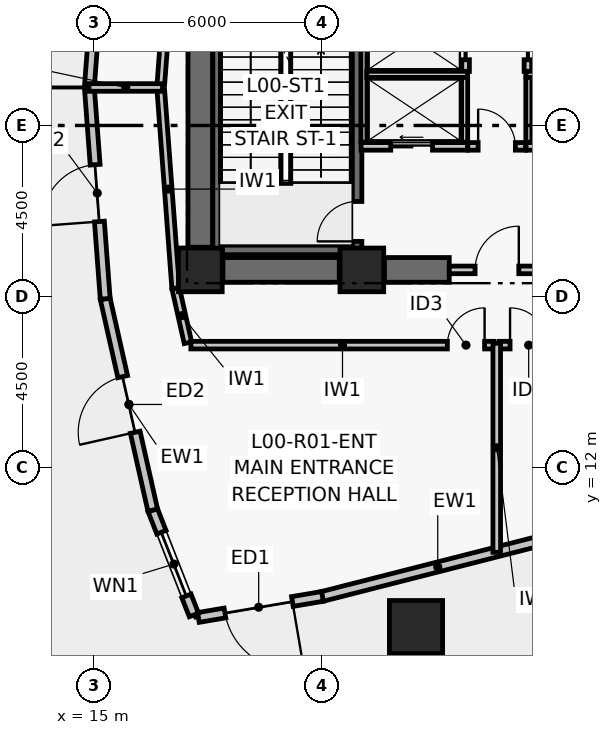
"""IFC4 building model, lengths in metres.
Left out: names, types, materials, properties, quantities, classifications, styles, units other than length and angle.
Written with IfcOpenShell. Run it as: python <this file> out.ifc"""

import sys

from ifc_helpers import new_model, si_unit, direction, frame, frame_2d, origin, origin_2d, place, context, subcontext, project, spatial, rectangle, hollow_rectangle, extrude, element, fill, save


model = new_model("IFC4")
c1 = context("Model", 3, precision=1e-05, world=origin(), true_north=direction((0.0, 1.0)))
c2 = subcontext(c1, "Body", "Model", "MODEL_VIEW")
j1 = project(units=[si_unit("LENGTHUNIT", "METRE"), si_unit("PLANEANGLEUNIT", "RADIAN")], contexts=[c1])
p1 = place(None, origin())
s1 = spatial("IfcSite", under=j1, at=p1, CompositionType="ELEMENT")
p2 = place(p1, origin())
s2 = spatial("IfcBuilding", under=s1, at=p2, CompositionType="ELEMENT")
p3 = place(p2, origin())
s3 = spatial("IfcBuildingStorey", under=s2, at=p3, CompositionType="ELEMENT", Elevation=0.0)
for number, where, z_axis, x_axis in (
    (1, (17.8, 17.2, 0.0), (0.0, 0.0, 1.0), (1.0, 0.0, 0.0)),
    (2, (22.05, 17.2, 0.0), (0.0, 0.0, 1.0), (1.0, 0.0, 0.0)),
):
    element("IfcColumn", number, at=place(p3, frame(where, z_axis=z_axis, x_axis=x_axis)), inside=s3, PredefinedType="COLUMN", context=c2, shape_type="SweptSolid", body=[
        extrude(rectangle(XDim=1.15, YDim=1.15, at=origin_2d()), origin(), (0.0, 0.0, 1.0), 7.2),
    ])
p4 = place(p3, frame((18.395, 17.2, 0.0), z_axis=(0.0, 0.0, 1.0), x_axis=(1.0, 0.0, 0.0)))
e3 = element("IfcWall", 3, at=p4, inside=s3, PredefinedType="SHEAR", context=c2, shape_type="SweptSolid", body=[
    extrude(rectangle(XDim=3.06, YDim=0.65, at=frame_2d((1.53, 0.0))), origin(), (0.0, 0.0, 1.0), 6.88),
])
p5 = place(p3, frame((22.645, 17.2, 0.0), z_axis=(0.0, 0.0, 1.0), x_axis=(1.0, 0.0, 0.0)))
e4 = element("IfcWall", 4, at=p5, inside=s3, PredefinedType="SHEAR", context=c2, shape_type="SweptSolid", body=[
    extrude(rectangle(XDim=1.705, YDim=0.65, at=frame_2d((0.853, 0.0))), origin(), (0.0, 0.0, 1.0), 6.88),
])
p6 = place(p3, frame((17.8, 17.795, 0.0), z_axis=(0.0, 0.0, 1.0), x_axis=(0.0, 1.0, 0.0)))
e5 = element("IfcWall", 5, at=p6, inside=s3, PredefinedType="SHEAR", context=c2, shape_type="SweptSolid", body=[
    extrude(rectangle(XDim=8.41, YDim=0.65, at=frame_2d((4.205, 0.0))), origin(), (0.0, 0.0, 1.0), 6.88),
])
p7 = place(p3, frame((18.254, 17.6, 0.0), z_axis=(0.0, 0.0, 1.0), x_axis=(0.0, 1.0, 0.0)))
e6 = element("IfcWall", 6, at=p7, inside=s3, PredefinedType="SHEAR", context=c2, shape_type="SweptSolid", body=[
    extrude(rectangle(XDim=8.8, YDim=0.25, at=frame_2d((4.4, 0.0))), origin(), (0.0, 0.0, 1.0), 6.88),
])
p8 = place(p3, frame((21.925, 17.6, 0.0), z_axis=(0.0, 0.0, 1.0), x_axis=(0.0, 1.0, 0.0)))
e7 = element("IfcWall", 7, at=p8, inside=s3, PredefinedType="SHEAR", context=c2, shape_type="SweptSolid", body=[
    extrude(rectangle(XDim=8.8, YDim=0.25, at=frame_2d((4.4, 0.0))), origin(), (0.0, 0.0, 1.0), 6.88),
])
p9 = place(p8, frame((0.35, 0.0, 0.0)))
e8 = element("IfcOpeningElement", 8, at=p9, cuts=e7, PredefinedType="OPENING", context=c2, shape_type="SweptSolid", body=[
    extrude(rectangle(XDim=1.05, YDim=2.08, at=frame_2d((0.525, 1.04))), frame((0.0, 0.135, 0.0), z_axis=(0.0, -1.0, 0.0), x_axis=(1.0, 0.0, 0.0)), (0.0, 0.0, 1.0), 0.27),
])
p10 = place(p3, frame((18.379, 17.725, 0.0), z_axis=(0.0, 0.0, 1.0), x_axis=(1.0, 0.0, 0.0)))
e9 = element("IfcWall", 9, at=p10, inside=s3, PredefinedType="SHEAR", context=c2, shape_type="SweptSolid", body=[
    extrude(rectangle(XDim=3.421, YDim=0.25, at=frame_2d((1.71, 0.0))), origin(), (0.0, 0.0, 1.0), 6.88),
])
p11 = place(p3, frame((23.476, 7.8, 0.0), z_axis=(0.0, 0.0, 1.0), x_axis=(1.0, 0.0, 0.0)))
e10 = element("IfcColumn", 10, at=p11, inside=s3, PredefinedType="USERDEFINED", context=c2, shape_type="SweptSolid", body=[
    extrude(hollow_rectangle(XDim=1.4, YDim=1.4, WallThickness=0.055, at=origin_2d()), origin(), (0.0, 0.0, 1.0), 7.2),
])
p12 = place(p3, frame((27.092, 10.16, 0.0), z_axis=(0.0, 0.0, 1.0), x_axis=(-0.968977702302, -0.247148158887, 0.0)))
e11 = element("IfcWall", 11, at=p12, inside=s3, PredefinedType="PARTITIONING", context=c2, shape_type="SweptSolid", body=[
    extrude(rectangle(XDim=6.286, YDim=0.26, at=frame_2d((3.143, 0.0))), origin(), (0.0, 0.0, 1.0), 5.43),
])
p13 = place(p3, frame((21.013, 8.609, 0.0), z_axis=(0.0, 0.0, 1.0), x_axis=(-0.985893222855, -0.167375485445, 0.0)))
e12 = element("IfcWall", 12, at=p13, inside=s3, PredefinedType="PARTITIONING", context=c2, shape_type="SweptSolid", body=[
    extrude(rectangle(XDim=3.311, YDim=0.26, at=frame_2d((1.656, 0.0))), origin(), (0.0, 0.0, 1.0), 5.43),
])
p14 = place(p13, frame((0.802, 0.0, 0.0)))
e13 = element("IfcOpeningElement", 13, at=p14, cuts=e12, PredefinedType="OPENING", context=c2, shape_type="SweptSolid", body=[
    extrude(rectangle(XDim=1.8, YDim=2.3, at=frame_2d((0.9, 1.15))), frame((0.0, 0.14, 0.0), z_axis=(0.0, -1.0, 0.0), x_axis=(1.0, 0.0, 0.0)), (0.0, 0.0, 1.0), 0.28),
])
p15 = place(p3, frame((17.631, 8.121, 0.0), z_axis=(0.0, 0.0, 1.0), x_axis=(-0.36552999723, 0.930799560123, 0.0)))
e14 = element("IfcWall", 14, at=p15, inside=s3, PredefinedType="PARTITIONING", context=c2, shape_type="SweptSolid", body=[
    extrude(rectangle(XDim=2.963, YDim=0.26, at=frame_2d((1.481, 0.0))), origin(), (0.0, 0.0, 1.0), 5.43),
])
p16 = place(p15, frame((0.538, 0.0, 0.9)))
e15 = element("IfcOpeningElement", 15, at=p16, cuts=e14, PredefinedType="OPENING", context=c2, shape_type="SweptSolid", body=[
    extrude(rectangle(XDim=1.8, YDim=1.5, at=frame_2d((0.9, 0.75))), frame((0.0, 0.14, 0.0), z_axis=(0.0, -1.0, 0.0), x_axis=(1.0, 0.0, 0.0)), (0.0, 0.0, 1.0), 0.28),
])
p17 = place(p3, frame((16.548, 10.879, 0.0), z_axis=(0.0, 0.0, 1.0), x_axis=(-0.219487732338, 0.975615259902, 0.0)))
e16 = element("IfcWall", 16, at=p17, inside=s3, PredefinedType="PARTITIONING", context=c2, shape_type="SweptSolid", body=[
    extrude(rectangle(XDim=5.699, YDim=0.26, at=frame_2d((2.85, 0.0))), origin(), (0.0, 0.0, 1.0), 5.43),
])
p18 = place(p17, frame((2.1, 0.0, 0.0)))
e17 = element("IfcOpeningElement", 17, at=p18, cuts=e16, PredefinedType="OPENING", context=c2, shape_type="SweptSolid", body=[
    extrude(rectangle(XDim=1.5, YDim=2.25, at=frame_2d((0.75, 1.125))), frame((0.0, 0.14, 0.0), z_axis=(0.0, -1.0, 0.0), x_axis=(1.0, 0.0, 0.0)), (0.0, 0.0, 1.0), 0.28),
])
p19 = place(p3, frame((15.297, 16.439, 0.0), z_axis=(0.0, 0.0, 1.0), x_axis=(-0.074824778503, 0.997196697007, 0.0)))
e18 = element("IfcWall", 18, at=p19, inside=s3, PredefinedType="PARTITIONING", context=c2, shape_type="SweptSolid", body=[
    extrude(rectangle(XDim=5.576, YDim=0.26, at=frame_2d((2.788, 0.0))), origin(), (0.0, 0.0, 1.0), 5.43),
])
p20 = place(p19, frame((2.038, 0.0, 0.0)))
e19 = element("IfcOpeningElement", 19, at=p20, cuts=e18, PredefinedType="OPENING", context=c2, shape_type="SweptSolid", body=[
    extrude(rectangle(XDim=1.5, YDim=2.25, at=frame_2d((0.75, 1.125))), frame((0.0, 0.14, 0.0), z_axis=(0.0, -1.0, 0.0), x_axis=(1.0, 0.0, 0.0)), (0.0, 0.0, 1.0), 0.28),
])
p21 = place(p3, frame((14.879, 22.0, 0.0), z_axis=(0.0, 0.0, 1.0), x_axis=(0.074824778503, 0.997196697007, 0.0)))
e20 = element("IfcWall", 20, at=p21, inside=s3, PredefinedType="PARTITIONING", context=c2, shape_type="SweptSolid", body=[
    extrude(rectangle(XDim=5.576, YDim=0.26, at=frame_2d((2.788, 0.0))), origin(), (0.0, 0.0, 1.0), 5.43),
])
p22 = place(p21, frame((2.038, 0.0, 0.0)))
e21 = element("IfcOpeningElement", 21, at=p22, cuts=e20, PredefinedType="OPENING", context=c2, shape_type="SweptSolid", body=[
    extrude(rectangle(XDim=1.5, YDim=2.25, at=frame_2d((0.75, 1.125))), frame((0.0, 0.14, 0.0), z_axis=(0.0, -1.0, 0.0), x_axis=(1.0, 0.0, 0.0)), (0.0, 0.0, 1.0), 0.28),
])
p23 = place(p3, frame((24.35, 17.2, 0.0), z_axis=(0.0, 0.0, 1.0), x_axis=(1.0, 0.0, 0.0)))
e22 = element("IfcWall", 22, at=p23, inside=s3, PredefinedType="PARTITIONING", context=c2, shape_type="SweptSolid", body=[
    extrude(rectangle(XDim=2.5, YDim=0.2, at=frame_2d((1.25, 0.0))), origin(), (0.0, 0.0, 1.0), 6.01),
])
p24 = place(p23, frame((0.68, 0.0, 0.0)))
e23 = element("IfcOpeningElement", 23, at=p24, cuts=e22, PredefinedType="OPENING", context=c2, shape_type="SweptSolid", body=[
    extrude(rectangle(XDim=1.15, YDim=2.08, at=frame_2d((0.575, 1.04))), frame((0.0, 0.11, 0.0), z_axis=(0.0, -1.0, 0.0), x_axis=(1.0, 0.0, 0.0)), (0.0, 0.0, 1.0), 0.22),
])
p25 = place(p3, frame((24.84, 20.45, 0.0), z_axis=(0.0, 0.0, 1.0), x_axis=(1.0, 0.0, 0.0)))
e24 = element("IfcWall", 24, at=p25, inside=s3, PredefinedType="PARTITIONING", context=c2, shape_type="SweptSolid", body=[
    extrude(rectangle(XDim=1.52, YDim=0.2, at=frame_2d((0.76, 0.0))), origin(), (0.0, 0.0, 1.0), 6.88),
])
p26 = place(p25, frame((0.27, 0.0, 0.0)))
e25 = element("IfcOpeningElement", 25, at=p26, cuts=e24, PredefinedType="OPENING", context=c2, shape_type="SweptSolid", body=[
    extrude(rectangle(XDim=0.98, YDim=2.06, at=frame_2d((0.49, 1.03))), frame((0.0, 0.11, 0.0), z_axis=(0.0, -1.0, 0.0), x_axis=(1.0, 0.0, 0.0)), (0.0, 0.0, 1.0), 0.22),
])
p27 = place(p3, frame((22.03, 20.45, 0.0), z_axis=(0.0, 0.0, 1.0), x_axis=(1.0, 0.0, 0.0)))
e26 = element("IfcWall", 26, at=p27, inside=s3, PredefinedType="PARTITIONING", context=c2, shape_type="SweptSolid", body=[
    extrude(rectangle(XDim=2.8, YDim=0.2, at=frame_2d((1.4, 0.0))), origin(), (0.0, 0.0, 1.0), 6.88),
])
p28 = place(p27, frame((0.78, 0.0, 0.0)))
e27 = element("IfcOpeningElement", 27, at=p28, cuts=e26, PredefinedType="OPENING", context=c2, shape_type="SweptSolid", body=[
    extrude(rectangle(XDim=1.1, YDim=2.08, at=frame_2d((0.55, 1.04))), frame((0.0, 0.11, 0.0), z_axis=(0.0, -1.0, 0.0), x_axis=(1.0, 0.0, 0.0)), (0.0, 0.0, 1.0), 0.22),
])
p29 = place(p3, frame((26.37, 20.45, 0.0), z_axis=(0.0, 0.0, 1.0), x_axis=(1.0, 0.0, 0.0)))
e28 = element("IfcWall", 28, at=p29, inside=s3, PredefinedType="PARTITIONING", context=c2, shape_type="SweptSolid", body=[
    extrude(rectangle(XDim=2.8, YDim=0.2, at=frame_2d((1.4, 0.0))), origin(), (0.0, 0.0, 1.0), 6.88),
])
p30 = place(p29, frame((0.78, 0.0, 0.0)))
e29 = element("IfcOpeningElement", 29, at=p30, cuts=e28, PredefinedType="OPENING", context=c2, shape_type="SweptSolid", body=[
    extrude(rectangle(XDim=1.1, YDim=2.08, at=frame_2d((0.55, 1.04))), frame((0.0, 0.11, 0.0), z_axis=(0.0, -1.0, 0.0), x_axis=(1.0, 0.0, 0.0)), (0.0, 0.0, 1.0), 0.22),
])
p31 = place(p3, frame((24.78, 22.42, 0.0), z_axis=(0.0, 0.0, 1.0), x_axis=(0.0, 1.0, 0.0)))
e30 = element("IfcWall", 30, at=p31, inside=s3, PredefinedType="PARTITIONING", context=c2, shape_type="SweptSolid", body=[
    extrude(rectangle(XDim=1.72, YDim=0.2, at=frame_2d((0.86, 0.0))), origin(), (0.0, 0.0, 1.0), 6.88),
])
p32 = place(p31, frame((0.31, 0.0, 0.0)))
e31 = element("IfcOpeningElement", 31, at=p32, cuts=e30, PredefinedType="OPENING", context=c2, shape_type="SweptSolid", body=[
    extrude(rectangle(XDim=1.1, YDim=2.08, at=frame_2d((0.55, 1.04))), frame((0.0, 0.11, 0.0), z_axis=(0.0, -1.0, 0.0), x_axis=(1.0, 0.0, 0.0)), (0.0, 0.0, 1.0), 0.22),
])
p33 = place(p3, frame((26.42, 22.42, 0.0), z_axis=(0.0, 0.0, 1.0), x_axis=(0.0, 1.0, 0.0)))
e32 = element("IfcWall", 32, at=p33, inside=s3, PredefinedType="PARTITIONING", context=c2, shape_type="SweptSolid", body=[
    extrude(rectangle(XDim=1.72, YDim=0.2, at=frame_2d((0.86, 0.0))), origin(), (0.0, 0.0, 1.0), 6.88),
])
p34 = place(p33, frame((0.31, 0.0, 0.0)))
e33 = element("IfcOpeningElement", 33, at=p34, cuts=e32, PredefinedType="OPENING", context=c2, shape_type="SweptSolid", body=[
    extrude(rectangle(XDim=1.1, YDim=2.08, at=frame_2d((0.55, 1.04))), frame((0.0, 0.11, 0.0), z_axis=(0.0, -1.0, 0.0), x_axis=(1.0, 0.0, 0.0)), (0.0, 0.0, 1.0), 0.22),
])
p35 = place(p3, frame((22.105, 20.56, 0.0), z_axis=(0.0, 0.0, 1.0), x_axis=(0.0, 1.0, 0.0)))
e34 = element("IfcWall", 34, at=p35, inside=s3, PredefinedType="PARTITIONING", context=c2, shape_type="SweptSolid", body=[
    extrude(rectangle(XDim=5.45, YDim=0.16, at=frame_2d((2.725, 0.0))), origin(), (0.0, 0.0, 1.0), 6.88),
])
p36 = place(p3, frame((24.755, 20.56, 0.0), z_axis=(0.0, 0.0, 1.0), x_axis=(0.0, 1.0, 0.0)))
e35 = element("IfcWall", 35, at=p36, inside=s3, PredefinedType="PARTITIONING", context=c2, shape_type="SweptSolid", body=[
    extrude(rectangle(XDim=1.71, YDim=0.16, at=frame_2d((0.855, 0.0))), origin(), (0.0, 0.0, 1.0), 6.88),
])
p37 = place(p3, frame((22.18, 22.345, 0.0), z_axis=(0.0, 0.0, 1.0), x_axis=(1.0, 0.0, 0.0)))
e36 = element("IfcWall", 36, at=p37, inside=s3, PredefinedType="PARTITIONING", context=c2, shape_type="SweptSolid", body=[
    extrude(rectangle(XDim=2.65, YDim=0.16, at=frame_2d((1.325, 0.0))), origin(), (0.0, 0.0, 1.0), 6.88),
])
p38 = place(p3, frame((26.445, 20.56, 0.0), z_axis=(0.0, 0.0, 1.0), x_axis=(0.0, 1.0, 0.0)))
e37 = element("IfcWall", 37, at=p38, inside=s3, PredefinedType="PARTITIONING", context=c2, shape_type="SweptSolid", body=[
    extrude(rectangle(XDim=1.71, YDim=0.16, at=frame_2d((0.855, 0.0))), origin(), (0.0, 0.0, 1.0), 6.88),
])
p39 = place(p3, frame((26.37, 22.345, 0.0), z_axis=(0.0, 0.0, 1.0), x_axis=(1.0, 0.0, 0.0)))
e38 = element("IfcWall", 38, at=p39, inside=s3, PredefinedType="PARTITIONING", context=c2, shape_type="SweptSolid", body=[
    extrude(rectangle(XDim=2.65, YDim=0.16, at=frame_2d((1.325, 0.0))), origin(), (0.0, 0.0, 1.0), 6.88),
])
p40 = place(p3, frame((16.76, 21.93, 0.0), z_axis=(0.0, 0.0, 1.0), x_axis=(0.074794596755, -0.997198961239, 0.0)))
e39 = element("IfcWall", 39, at=p40, inside=s3, PredefinedType="PARTITIONING", context=c2, shape_type="SweptSolid", body=[
    extrude(rectangle(XDim=5.223, YDim=0.2, at=frame_2d((2.611, 0.0))), origin(), (0.0, 0.0, 1.0), 5.46),
])
p41 = place(p3, frame((17.152, 16.71, 0.0), z_axis=(0.0, 0.0, 1.0), x_axis=(0.219508226064, -0.975610649127, 0.0)))
e40 = element("IfcWall", 40, at=p41, inside=s3, PredefinedType="PARTITIONING", context=c2, shape_type="SweptSolid", body=[
    extrude(rectangle(XDim=1.464, YDim=0.2, at=frame_2d((0.732, 0.0))), origin(), (0.0, 0.0, 1.0), 5.46),
])
p42 = place(p3, frame((17.552, 15.22, 0.0), z_axis=(0.0, 0.0, 1.0), x_axis=(1.0, 0.0, 0.0)))
e41 = element("IfcWall", 41, at=p42, inside=s3, PredefinedType="PARTITIONING", context=c2, shape_type="SweptSolid", body=[
    extrude(rectangle(XDim=7.978, YDim=0.2, at=frame_2d((3.989, 0.0))), origin(), (0.0, 0.0, 1.0), 5.46),
])
p43 = place(p42, frame((6.748, 0.0, 0.0)))
e42 = element("IfcOpeningElement", 42, at=p43, cuts=e41, PredefinedType="OPENING", context=c2, shape_type="SweptSolid", body=[
    extrude(rectangle(XDim=0.98, YDim=2.06, at=frame_2d((0.49, 1.03))), frame((0.0, 0.11, 0.0), z_axis=(0.0, -1.0, 0.0), x_axis=(1.0, 0.0, 0.0)), (0.0, 0.0, 1.0), 0.22),
])
p44 = place(p3, frame((25.67, 15.22, 0.0), z_axis=(0.0, 0.0, 1.0), x_axis=(1.0, 0.0, 0.0)))
e43 = element("IfcWall", 43, at=p44, inside=s3, PredefinedType="PARTITIONING", context=c2, shape_type="SweptSolid", body=[
    extrude(rectangle(XDim=7.13, YDim=0.2, at=frame_2d((3.565, 0.0))), origin(), (0.0, 0.0, 1.0), 6.88),
])
p45 = place(p44, frame((0.28, 0.0, 0.0)))
e44 = element("IfcOpeningElement", 44, at=p45, cuts=e43, PredefinedType="OPENING", context=c2, shape_type="SweptSolid", body=[
    extrude(rectangle(XDim=0.98, YDim=2.06, at=frame_2d((0.49, 1.03))), frame((0.0, 0.11, 0.0), z_axis=(0.0, -1.0, 0.0), x_axis=(1.0, 0.0, 0.0)), (0.0, 0.0, 1.0), 0.22),
])
p46 = place(p3, frame((17.151, 27.278, 0.0), z_axis=(0.0, 0.0, 1.0), x_axis=(-0.074794596755, -0.997198961239, 0.0)))
e45 = element("IfcWall", 45, at=p46, inside=s3, PredefinedType="PARTITIONING", context=c2, shape_type="SweptSolid", body=[
    extrude(rectangle(XDim=5.223, YDim=0.2, at=frame_2d((2.611, 0.0))), origin(), (0.0, 0.0, 1.0), 5.46),
])
p47 = place(p3, frame((25.6, 9.769, 0.0), z_axis=(0.0, 0.0, 1.0), x_axis=(0.0, 1.0, 0.0)))
e46 = element("IfcWall", 46, at=p47, inside=s3, PredefinedType="PARTITIONING", context=c2, shape_type="SweptSolid", body=[
    extrude(rectangle(XDim=5.501, YDim=0.2, at=frame_2d((2.75, 0.0))), origin(), (0.0, 0.0, 1.0), 6.88),
])
p48 = place(p3, frame((14.869, 22.0, 0.0), z_axis=(0.0, 0.0, 1.0), x_axis=(1.0, 0.0, 0.0)))
e47 = element("IfcWall", 47, at=p48, inside=s3, PredefinedType="PARTITIONING", context=c2, shape_type="SweptSolid", body=[
    extrude(rectangle(XDim=1.936, YDim=0.2, at=frame_2d((0.968, 0.0))), origin(), (0.0, 0.0, 1.0), 6.88),
])
p49 = place(p14, origin())
e48 = element("IfcDoor", 48, at=p49, inside=s3, OperationType="DOUBLE_DOOR_SINGLE_SWING", PredefinedType="DOOR", context=c2, shape_type="SweptSolid", body=[
    extrude(rectangle(XDim=1.8, YDim=2.3, at=frame_2d((0.9, 1.15))), frame((0.0, 0.025, 0.0), z_axis=(0.0, -1.0, 0.0), x_axis=(1.0, 0.0, 0.0)), (0.0, 0.0, 1.0), 0.05),
])
fill(e13, e48)
p50 = place(p16, origin())
e49 = element("IfcWindow", 49, at=p50, inside=s3, PartitioningType="SINGLE_PANEL", PredefinedType="WINDOW", context=c2, shape_type="SweptSolid", body=[
    extrude(rectangle(XDim=1.8, YDim=1.5, at=frame_2d((0.9, 0.75))), frame((0.0, 0.03, 0.0), z_axis=(0.0, -1.0, 0.0), x_axis=(1.0, 0.0, 0.0)), (0.0, 0.0, 1.0), 0.06),
])
fill(e15, e49)
p51 = place(p18, origin())
e50 = element("IfcDoor", 50, at=p51, inside=s3, OperationType="DOUBLE_DOOR_SINGLE_SWING", PredefinedType="DOOR", context=c2, shape_type="SweptSolid", body=[
    extrude(rectangle(XDim=1.5, YDim=2.25, at=frame_2d((0.75, 1.125))), frame((0.0, 0.025, 0.0), z_axis=(0.0, -1.0, 0.0), x_axis=(1.0, 0.0, 0.0)), (0.0, 0.0, 1.0), 0.05),
])
fill(e17, e50)
p52 = place(p20, origin())
e51 = element("IfcDoor", 51, at=p52, inside=s3, OperationType="DOUBLE_DOOR_SINGLE_SWING", PredefinedType="DOOR", context=c2, shape_type="SweptSolid", body=[
    extrude(rectangle(XDim=1.5, YDim=2.25, at=frame_2d((0.75, 1.125))), frame((0.0, 0.025, 0.0), z_axis=(0.0, -1.0, 0.0), x_axis=(1.0, 0.0, 0.0)), (0.0, 0.0, 1.0), 0.05),
])
fill(e19, e51)
p53 = place(p9, origin())
e52 = element("IfcDoor", 52, at=p53, inside=s3, OperationType="SINGLE_SWING_LEFT", PredefinedType="DOOR", context=c2, shape_type="SweptSolid", body=[
    extrude(rectangle(XDim=1.05, YDim=2.08, at=frame_2d((0.525, 1.04))), frame((0.0, 0.025, 0.0), z_axis=(0.0, -1.0, 0.0), x_axis=(1.0, 0.0, 0.0)), (0.0, 0.0, 1.0), 0.05),
])
fill(e8, e52)
p54 = place(p24, origin())
e53 = element("IfcDoor", 53, at=p54, inside=s3, OperationType="SINGLE_SWING_RIGHT", PredefinedType="DOOR", context=c2, shape_type="SweptSolid", body=[
    extrude(rectangle(XDim=1.15, YDim=2.08, at=frame_2d((0.575, 1.04))), frame((0.0, 0.025, 0.0), z_axis=(0.0, -1.0, 0.0), x_axis=(1.0, 0.0, 0.0)), (0.0, 0.0, 1.0), 0.05),
])
fill(e23, e53)
p55 = place(p26, origin())
e54 = element("IfcDoor", 54, at=p55, inside=s3, OperationType="SINGLE_SWING_LEFT", PredefinedType="DOOR", context=c2, shape_type="SweptSolid", body=[
    extrude(rectangle(XDim=0.98, YDim=2.06, at=frame_2d((0.49, 1.03))), frame((0.0, 0.025, 0.0), z_axis=(0.0, -1.0, 0.0), x_axis=(1.0, 0.0, 0.0)), (0.0, 0.0, 1.0), 0.05),
])
fill(e25, e54)
p56 = place(p28, origin())
e55 = element("IfcDoor", 55, at=p56, inside=s3, OperationType="DOUBLE_DOOR_SLIDING", PredefinedType="DOOR", context=c2, shape_type="SweptSolid", body=[
    extrude(rectangle(XDim=1.1, YDim=2.08, at=frame_2d((0.55, 1.04))), frame((0.0, 0.025, 0.0), z_axis=(0.0, -1.0, 0.0), x_axis=(1.0, 0.0, 0.0)), (0.0, 0.0, 1.0), 0.05),
])
fill(e27, e55)
p57 = place(p32, origin())
e56 = element("IfcDoor", 56, at=p57, inside=s3, OperationType="DOUBLE_DOOR_SLIDING", PredefinedType="DOOR", context=c2, shape_type="SweptSolid", body=[
    extrude(rectangle(XDim=1.1, YDim=2.08, at=frame_2d((0.55, 1.04))), frame((0.0, 0.025, 0.0), z_axis=(0.0, -1.0, 0.0), x_axis=(1.0, 0.0, 0.0)), (0.0, 0.0, 1.0), 0.05),
])
fill(e31, e56)
p58 = place(p34, origin())
e57 = element("IfcDoor", 57, at=p58, inside=s3, OperationType="DOUBLE_DOOR_SLIDING", PredefinedType="DOOR", context=c2, shape_type="SweptSolid", body=[
    extrude(rectangle(XDim=1.1, YDim=2.08, at=frame_2d((0.55, 1.04))), frame((0.0, 0.025, 0.0), z_axis=(0.0, -1.0, 0.0), x_axis=(1.0, 0.0, 0.0)), (0.0, 0.0, 1.0), 0.05),
])
fill(e33, e57)
p59 = place(p43, origin())
e58 = element("IfcDoor", 58, at=p59, inside=s3, OperationType="SINGLE_SWING_RIGHT", PredefinedType="DOOR", context=c2, shape_type="SweptSolid", body=[
    extrude(rectangle(XDim=0.98, YDim=2.06, at=frame_2d((0.49, 1.03))), frame((0.0, 0.025, 0.0), z_axis=(0.0, -1.0, 0.0), x_axis=(1.0, 0.0, 0.0)), (0.0, 0.0, 1.0), 0.05),
])
fill(e42, e58)
p60 = place(p45, origin())
e59 = element("IfcDoor", 59, at=p60, inside=s3, OperationType="SINGLE_SWING_LEFT", PredefinedType="DOOR", context=c2, shape_type="SweptSolid", body=[
    extrude(rectangle(XDim=0.98, YDim=2.06, at=frame_2d((0.49, 1.03))), frame((0.0, 0.025, 0.0), z_axis=(0.0, -1.0, 0.0), x_axis=(1.0, 0.0, 0.0)), (0.0, 0.0, 1.0), 0.05),
])
fill(e44, e59)
save(model, sys.argv[1])
